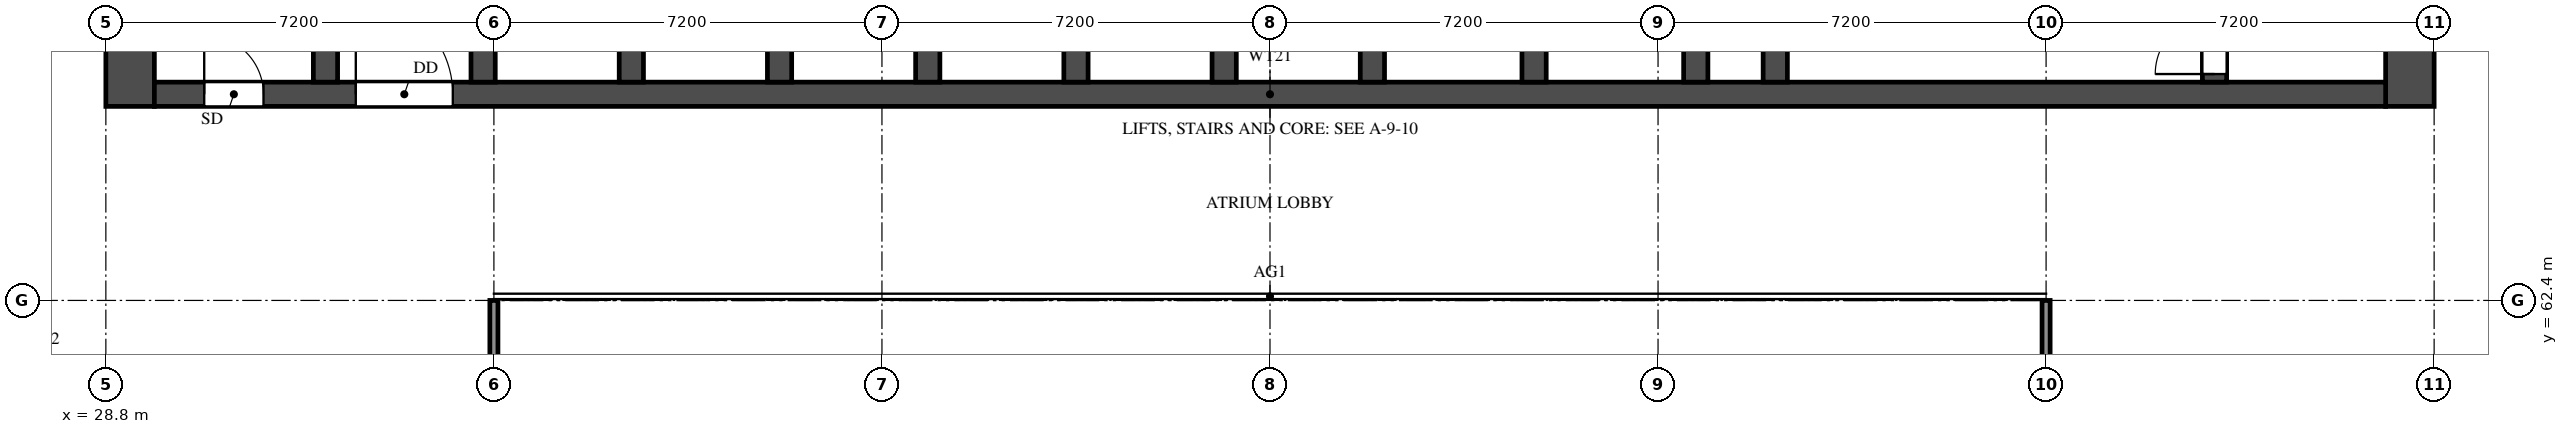
"""IFC4 building model, lengths in metres.
Left out: names, types, materials, properties, quantities, classifications, styles, units other than length and angle.
Written with IfcOpenShell. Run it as: python <this file> out.ifc"""

import sys

from ifc_helpers import new_model, si_unit, direction, frame, frame_2d, origin, place, context, subcontext, project, spatial, rectangle, extrude, element, fill, save


model = new_model("IFC4")
c1 = context("Model", 3, precision=1e-05, world=origin(), true_north=direction((0.0, 1.0)))
c2 = subcontext(c1, "Body", "Model", "MODEL_VIEW")
j1 = project(units=[si_unit("LENGTHUNIT", "METRE"), si_unit("PLANEANGLEUNIT", "RADIAN")], contexts=[c1])
p1 = place(None, origin())
s1 = spatial("IfcSite", under=j1, at=p1, CompositionType="ELEMENT")
p2 = place(p1, origin())
s2 = spatial("IfcBuilding", under=s1, at=p2, CompositionType="ELEMENT")
p3 = place(p2, frame((0.0, 0.0, 58.5)))
s3 = spatial("IfcBuildingStorey", under=s2, at=p3, CompositionType="ELEMENT", Elevation=58.5)
for number, where, z_axis, x_axis in (
    (1, (29.25, 66.0, 0.0), (0.0, 0.0, 1.0), (0.0, 1.0, 0.0)),
    (2, (71.55, 66.0, 0.0), (0.0, 0.0, 1.0), (0.0, 1.0, 0.0)),
):
    element("IfcWall", number, at=place(p3, frame(where, z_axis=z_axis, x_axis=x_axis)), inside=s3, PredefinedType="SHEAR", context=c2, shape_type="SweptSolid", body=[
        extrude(rectangle(XDim=12.0, YDim=0.9, at=frame_2d((6.0, 0.0))), origin(), (0.0, 0.0, 1.0), 3.18),
    ])
p4 = place(p3, frame((29.7, 66.225, 0.0), z_axis=(0.0, 0.0, 1.0), x_axis=(1.0, 0.0, 0.0)))
e3 = element("IfcWall", 3, at=p4, inside=s3, PredefinedType="SHEAR", context=c2, shape_type="SweptSolid", body=[
    extrude(rectangle(XDim=41.4, YDim=0.45, at=frame_2d((20.7, 0.0))), origin(), (0.0, 0.0, 1.0), 3.18),
])
p5 = place(p4, frame((0.925, 0.0, 0.0)))
e4 = element("IfcOpeningElement", 4, at=p5, cuts=e3, PredefinedType="OPENING", context=c2, shape_type="SweptSolid", body=[
    extrude(rectangle(XDim=1.1, YDim=2.1, at=frame_2d((0.55, 1.05))), frame((0.0, 0.235, 0.0), z_axis=(0.0, -1.0, 0.0), x_axis=(1.0, 0.0, 0.0)), (0.0, 0.0, 1.0), 0.47),
])
p6 = place(p4, frame((3.738, 0.0, 0.0)))
e5 = element("IfcOpeningElement", 5, at=p6, cuts=e3, PredefinedType="OPENING", context=c2, shape_type="SweptSolid", body=[
    extrude(rectangle(XDim=1.8, YDim=2.1, at=frame_2d((0.9, 1.05))), frame((0.0, 0.235, 0.0), z_axis=(0.0, -1.0, 0.0), x_axis=(1.0, 0.0, 0.0)), (0.0, 0.0, 1.0), 0.47),
])
p7 = place(p3, frame((32.875, 66.45, 0.0), z_axis=(0.0, 0.0, 1.0), x_axis=(0.0, 1.0, 0.0)))
e6 = element("IfcWall", 6, at=p7, inside=s3, PredefinedType="SHEAR", context=c2, shape_type="SweptSolid", body=[
    extrude(rectangle(XDim=10.65, YDim=0.45, at=frame_2d((5.325, 0.0))), origin(), (0.0, 0.0, 1.0), 3.18),
])
p8 = place(p3, frame((67.925, 66.45, 0.0), z_axis=(0.0, 0.0, 1.0), x_axis=(0.0, 1.0, 0.0)))
e7 = element("IfcWall", 7, at=p8, inside=s3, PredefinedType="SHEAR", context=c2, shape_type="SweptSolid", body=[
    extrude(rectangle(XDim=10.65, YDim=0.45, at=frame_2d((5.325, 0.0))), origin(), (0.0, 0.0, 1.0), 3.18),
])
p9 = place(p8, frame((0.15, 0.0, 0.0)))
e8 = element("IfcOpeningElement", 8, at=p9, cuts=e7, PredefinedType="OPENING", context=c2, shape_type="SweptSolid", body=[
    extrude(rectangle(XDim=1.1, YDim=2.1, at=frame_2d((0.55, 1.05))), frame((0.0, 0.235, 0.0), z_axis=(0.0, -1.0, 0.0), x_axis=(1.0, 0.0, 0.0)), (0.0, 0.0, 1.0), 0.47),
])
p10 = place(p3, frame((59.775, 66.45, 0.0), z_axis=(0.0, 0.0, 1.0), x_axis=(0.0, 1.0, 0.0)))
e9 = element("IfcWall", 9, at=p10, inside=s3, PredefinedType="SHEAR", context=c2, shape_type="SweptSolid", body=[
    extrude(rectangle(XDim=6.025, YDim=0.45, at=frame_2d((3.013, 0.0))), origin(), (0.0, 0.0, 1.0), 3.18),
])
p11 = place(p10, frame((3.85, 0.0, 0.0)))
e10 = element("IfcOpeningElement", 10, at=p11, cuts=e9, PredefinedType="OPENING", context=c2, shape_type="SweptSolid", body=[
    extrude(rectangle(XDim=1.2, YDim=2.1, at=frame_2d((0.6, 1.05))), frame((0.0, 0.235, 0.0), z_axis=(0.0, -1.0, 0.0), x_axis=(1.0, 0.0, 0.0)), (0.0, 0.0, 1.0), 0.47),
])
for number, where, z_axis, x_axis in (
    (11, (35.8, 66.45, 0.0), (0.0, 0.0, 1.0), (0.0, 1.0, 0.0)),
    (12, (38.55, 66.45, 0.0), (0.0, 0.0, 1.0), (0.0, 1.0, 0.0)),
    (13, (41.3, 66.45, 0.0), (0.0, 0.0, 1.0), (0.0, 1.0, 0.0)),
    (14, (44.05, 66.45, 0.0), (0.0, 0.0, 1.0), (0.0, 1.0, 0.0)),
    (15, (46.8, 66.45, 0.0), (0.0, 0.0, 1.0), (0.0, 1.0, 0.0)),
    (16, (49.55, 66.45, 0.0), (0.0, 0.0, 1.0), (0.0, 1.0, 0.0)),
    (17, (52.3, 66.45, 0.0), (0.0, 0.0, 1.0), (0.0, 1.0, 0.0)),
    (18, (55.3, 66.45, 0.0), (0.0, 0.0, 1.0), (0.0, 1.0, 0.0)),
    (19, (58.3, 66.45, 0.0), (0.0, 0.0, 1.0), (0.0, 1.0, 0.0)),
):
    element("IfcWall", number, at=place(p3, frame(where, z_axis=z_axis, x_axis=x_axis)), inside=s3, PredefinedType="SHEAR", context=c2, shape_type="SweptSolid", body=[
        extrude(rectangle(XDim=2.425, YDim=0.45, at=frame_2d((1.212, 0.0))), origin(), (0.0, 0.0, 1.0), 3.18),
    ])
for number, where, z_axis, x_axis in (
    (20, (36.0, 48.0, 0.0), (0.0, 0.0, 1.0), (0.0, 1.0, 0.0)),
    (21, (64.8, 48.0, 0.0), (0.0, 0.0, 1.0), (0.0, 1.0, 0.0)),
):
    element("IfcWall", number, at=place(p3, frame(where, z_axis=z_axis, x_axis=x_axis)), inside=s3, PredefinedType="SOLIDWALL", context=c2, shape_type="SweptSolid", body=[
        extrude(rectangle(XDim=14.4, YDim=0.15, at=frame_2d((7.2, 0.0))), origin(), (0.0, 0.0, 1.0), 2.28),
    ])
p12 = place(p5, origin())
e22 = element("IfcDoor", 22, at=p12, inside=s3, OperationType="SINGLE_SWING_LEFT", PredefinedType="DOOR", context=c2, shape_type="SweptSolid", body=[
    extrude(rectangle(XDim=1.1, YDim=2.1, at=frame_2d((0.55, 1.05))), frame((0.0, 0.025, 0.0), z_axis=(0.0, -1.0, 0.0), x_axis=(1.0, 0.0, 0.0)), (0.0, 0.0, 1.0), 0.05),
])
fill(e4, e22)
p13 = place(p9, origin())
e23 = element("IfcDoor", 23, at=p13, inside=s3, OperationType="SINGLE_SWING_LEFT", PredefinedType="DOOR", context=c2, shape_type="SweptSolid", body=[
    extrude(rectangle(XDim=1.1, YDim=2.1, at=frame_2d((0.55, 1.05))), frame((0.0, 0.025, 0.0), z_axis=(0.0, -1.0, 0.0), x_axis=(1.0, 0.0, 0.0)), (0.0, 0.0, 1.0), 0.05),
])
fill(e8, e23)
p14 = place(p6, origin())
e24 = element("IfcDoor", 24, at=p14, inside=s3, OperationType="DOUBLE_DOOR_SINGLE_SWING", PredefinedType="DOOR", context=c2, shape_type="SweptSolid", body=[
    extrude(rectangle(XDim=1.8, YDim=2.1, at=frame_2d((0.9, 1.05))), frame((0.0, 0.025, 0.0), z_axis=(0.0, -1.0, 0.0), x_axis=(1.0, 0.0, 0.0)), (0.0, 0.0, 1.0), 0.05),
])
fill(e5, e24)
save(model, sys.argv[1])
